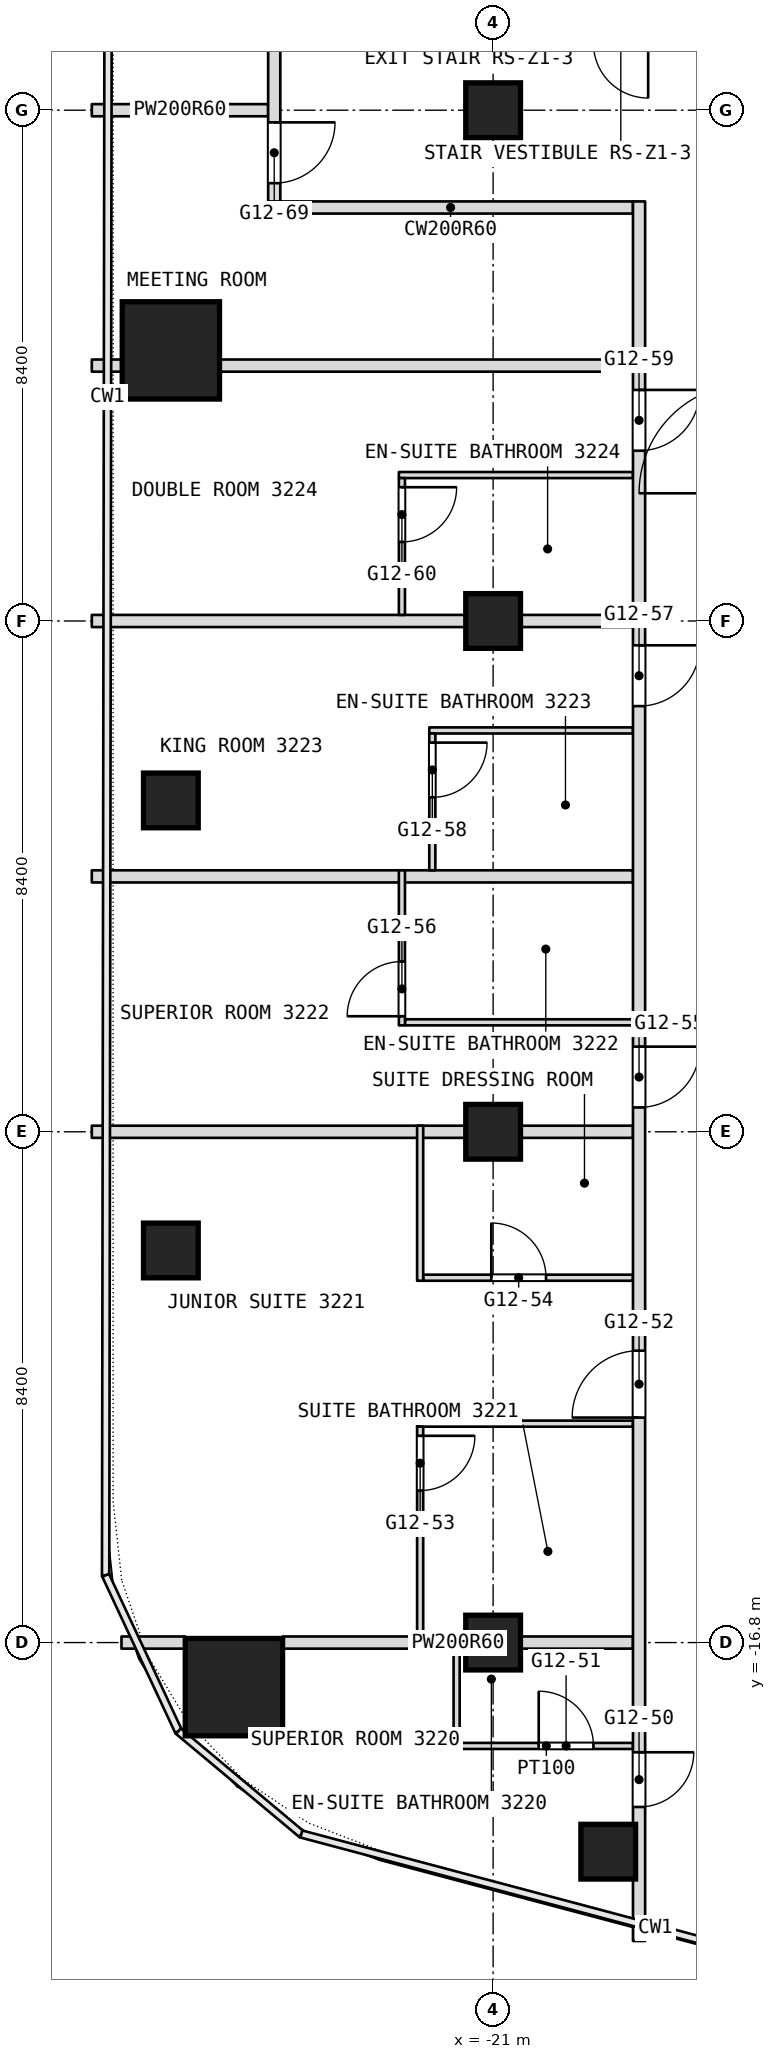
"""IFC4 building model, lengths in metres.
Left out: names, types, materials, properties, quantities, classifications, styles, units other than length and angle.
Written with IfcOpenShell. Run it as: python <this file> out.ifc"""

import sys

from ifc_helpers import new_model, si_unit, direction, frame, frame_2d, origin, origin_2d, place, context, subcontext, project, spatial, rectangle, extrude, element, fill, save


model = new_model("IFC4")
c1 = context("Model", 3, precision=1e-05, world=origin(), true_north=direction((0.0, 1.0)))
c2 = subcontext(c1, "Body", "Model", "MODEL_VIEW")
j1 = project(units=[si_unit("LENGTHUNIT", "METRE"), si_unit("PLANEANGLEUNIT", "RADIAN")], contexts=[c1])
p1 = place(None, origin())
s1 = spatial("IfcSite", under=j1, at=p1, CompositionType="ELEMENT")
p2 = place(p1, origin())
s2 = spatial("IfcBuilding", under=s1, at=p2, CompositionType="ELEMENT")
p3 = place(p2, frame((0.0, 0.0, 140.9)))
s3 = spatial("IfcBuildingStorey", under=s2, at=p3, CompositionType="ELEMENT", Elevation=140.9)
for number, where, z_axis, x_axis in (
    (1, (-25.263, -17.533, 0.0), (0.0, 0.0, 1.0), (1.0, 0.0, 0.0)),
    (2, (-26.3, 4.45, 0.0), (0.0, 0.0, 1.0), (1.0, 0.0, 0.0)),
):
    element("IfcColumn", number, at=place(p3, frame(where, z_axis=z_axis, x_axis=x_axis)), inside=s3, PredefinedType="COLUMN", context=c2, shape_type="SweptSolid", body=[
        extrude(rectangle(XDim=1.6, YDim=1.6, at=origin_2d()), origin(), (0.0, 0.0, 1.0), 3.6),
    ])
for number, where, z_axis, x_axis in (
    (3, (-21.0, -16.8, 0.0), (0.0, 0.0, 1.0), (1.0, 0.0, 0.0)),
    (4, (-21.0, -8.4, 0.0), (0.0, 0.0, 1.0), (1.0, 0.0, 0.0)),
    (5, (-21.0, 0.0, 0.0), (0.0, 0.0, 1.0), (1.0, 0.0, 0.0)),
    (6, (-21.0, 8.4, 0.0), (0.0, 0.0, 1.0), (1.0, 0.0, 0.0)),
    (7, (-26.3, -10.352, 0.0), (0.0, 0.0, 1.0), (1.0, 0.0, 0.0)),
    (8, (-26.3, -2.951, 0.0), (0.0, 0.0, 1.0), (1.0, 0.0, 0.0)),
    (9, (-19.107, -20.239, 0.0), (0.0, 0.0, 1.0), (1.0, 0.0, 0.0)),
):
    element("IfcColumn", number, at=place(p3, frame(where, z_axis=z_axis, x_axis=x_axis)), inside=s3, PredefinedType="COLUMN", context=c2, shape_type="SweptSolid", body=[
        extrude(rectangle(XDim=0.9, YDim=0.9, at=origin_2d()), origin(), (0.0, 0.0, 1.0), 3.6),
    ])
p4 = place(p3, frame((-21.55, -18.5, 0.0), z_axis=(0.0, 0.0, 1.0), x_axis=(1.0, 0.0, 0.0)))
e10 = element("IfcWall", 10, at=p4, inside=s3, PredefinedType="PARTITIONING", context=c2, shape_type="SweptSolid", body=[
    extrude(rectangle(XDim=2.85, YDim=0.1, at=frame_2d((1.425, 0.0))), origin(), (0.0, 0.0, 1.0), 3.34),
])
p5 = place(p4, frame((1.3, 0.0, 0.0)))
e11 = element("IfcOpeningElement", 11, at=p5, cuts=e10, PredefinedType="OPENING", context=c2, shape_type="SweptSolid", body=[
    extrude(rectangle(XDim=0.9, YDim=2.1, at=frame_2d((0.45, 1.05))), frame((0.0, 0.05, 0.0), z_axis=(0.0, -1.0, 0.0), x_axis=(1.0, 0.0, 0.0)), (0.0, 0.0, 1.0), 0.1),
])
p6 = place(p3, frame((-27.112, -16.8, 0.0), z_axis=(0.0, 0.0, 1.0), x_axis=(1.0, 0.0, 0.0)))
e12 = element("IfcWall", 12, at=p6, inside=s3, PredefinedType="PARTITIONING", context=c2, shape_type="SweptSolid", body=[
    extrude(rectangle(XDim=1.049, YDim=0.2, at=frame_2d((0.524, 0.0))), origin(), (0.0, 0.0, 1.0), 3.34),
])
p7 = place(p3, frame((-24.463, -16.8, 0.0), z_axis=(0.0, 0.0, 1.0), x_axis=(1.0, 0.0, 0.0)))
e13 = element("IfcWall", 13, at=p7, inside=s3, PredefinedType="PARTITIONING", context=c2, shape_type="SweptSolid", body=[
    extrude(rectangle(XDim=5.763, YDim=0.2, at=frame_2d((2.881, 0.0))), origin(), (0.0, 0.0, 1.0), 2.89),
])
p8 = place(p3, frame((-22.25, -13.2, 0.0), z_axis=(0.0, 0.0, 1.0), x_axis=(1.0, 0.0, 0.0)))
e14 = element("IfcWall", 14, at=p8, inside=s3, PredefinedType="PARTITIONING", context=c2, shape_type="SweptSolid", body=[
    extrude(rectangle(XDim=3.55, YDim=0.1, at=frame_2d((1.775, 0.0))), origin(), (0.0, 0.0, 1.0), 3.34),
])
p9 = place(p3, frame((-22.15, -10.8, 0.0), z_axis=(0.0, 0.0, 1.0), x_axis=(1.0, 0.0, 0.0)))
e15 = element("IfcWall", 15, at=p9, inside=s3, PredefinedType="PARTITIONING", context=c2, shape_type="SweptSolid", body=[
    extrude(rectangle(XDim=3.45, YDim=0.1, at=frame_2d((1.725, 0.0))), origin(), (0.0, 0.0, 1.0), 3.34),
])
p10 = place(p9, frame((1.12, 0.0, 0.0)))
e16 = element("IfcOpeningElement", 16, at=p10, cuts=e15, PredefinedType="OPENING", context=c2, shape_type="SweptSolid", body=[
    extrude(rectangle(XDim=0.9, YDim=2.1, at=frame_2d((0.45, 1.05))), frame((0.0, 0.05, 0.0), z_axis=(0.0, -1.0, 0.0), x_axis=(1.0, 0.0, 0.0)), (0.0, 0.0, 1.0), 0.1),
])
p11 = place(p3, frame((-27.6, -8.4, 0.0), z_axis=(0.0, 0.0, 1.0), x_axis=(1.0, 0.0, 0.0)))
e17 = element("IfcWall", 17, at=p11, inside=s3, PredefinedType="PARTITIONING", context=c2, shape_type="SweptSolid", body=[
    extrude(rectangle(XDim=8.9, YDim=0.2, at=frame_2d((4.45, 0.0))), origin(), (0.0, 0.0, 1.0), 2.89),
])
p12 = place(p3, frame((-22.45, -6.6, 0.0), z_axis=(0.0, 0.0, 1.0), x_axis=(1.0, 0.0, 0.0)))
e18 = element("IfcWall", 18, at=p12, inside=s3, PredefinedType="PARTITIONING", context=c2, shape_type="SweptSolid", body=[
    extrude(rectangle(XDim=3.75, YDim=0.1, at=frame_2d((1.875, 0.0))), origin(), (0.0, 0.0, 1.0), 3.34),
])
p13 = place(p3, frame((-27.6, -4.2, 0.0), z_axis=(0.0, 0.0, 1.0), x_axis=(1.0, 0.0, 0.0)))
e19 = element("IfcWall", 19, at=p13, inside=s3, PredefinedType="PARTITIONING", context=c2, shape_type="SweptSolid", body=[
    extrude(rectangle(XDim=8.9, YDim=0.2, at=frame_2d((4.45, 0.0))), origin(), (0.0, 0.0, 1.0), 3.34),
])
p14 = place(p3, frame((-22.05, -1.8, 0.0), z_axis=(0.0, 0.0, 1.0), x_axis=(1.0, 0.0, 0.0)))
e20 = element("IfcWall", 20, at=p14, inside=s3, PredefinedType="PARTITIONING", context=c2, shape_type="SweptSolid", body=[
    extrude(rectangle(XDim=3.35, YDim=0.1, at=frame_2d((1.675, 0.0))), origin(), (0.0, 0.0, 1.0), 3.34),
])
p15 = place(p3, frame((-27.6, 0.0, 0.0), z_axis=(0.0, 0.0, 1.0), x_axis=(1.0, 0.0, 0.0)))
e21 = element("IfcWall", 21, at=p15, inside=s3, PredefinedType="PARTITIONING", context=c2, shape_type="SweptSolid", body=[
    extrude(rectangle(XDim=8.9, YDim=0.2, at=frame_2d((4.45, 0.0))), origin(), (0.0, 0.0, 1.0), 2.89),
])
p16 = place(p3, frame((-22.55, 2.4, 0.0), z_axis=(0.0, 0.0, 1.0), x_axis=(1.0, 0.0, 0.0)))
e22 = element("IfcWall", 22, at=p16, inside=s3, PredefinedType="PARTITIONING", context=c2, shape_type="SweptSolid", body=[
    extrude(rectangle(XDim=3.85, YDim=0.1, at=frame_2d((1.925, 0.0))), origin(), (0.0, 0.0, 1.0), 3.34),
])
p17 = place(p3, frame((-27.6, 4.2, 0.0), z_axis=(0.0, 0.0, 1.0), x_axis=(1.0, 0.0, 0.0)))
e23 = element("IfcWall", 23, at=p17, inside=s3, PredefinedType="PARTITIONING", context=c2, shape_type="SweptSolid", body=[
    extrude(rectangle(XDim=0.5, YDim=0.2, at=frame_2d((0.25, 0.0))), origin(), (0.0, 0.0, 1.0), 3.34),
])
p18 = place(p3, frame((-25.5, 4.2, 0.0), z_axis=(0.0, 0.0, 1.0), x_axis=(1.0, 0.0, 0.0)))
e24 = element("IfcWall", 24, at=p18, inside=s3, PredefinedType="PARTITIONING", context=c2, shape_type="SweptSolid", body=[
    extrude(rectangle(XDim=6.8, YDim=0.2, at=frame_2d((3.4, 0.0))), origin(), (0.0, 0.0, 1.0), 3.34),
])
p19 = place(p3, frame((-24.7, 6.8, 0.0), z_axis=(0.0, 0.0, 1.0), x_axis=(1.0, 0.0, 0.0)))
e25 = element("IfcWall", 25, at=p19, inside=s3, PredefinedType="PARTITIONING", context=c2, shape_type="SweptSolid", body=[
    extrude(rectangle(XDim=6.0, YDim=0.2, at=frame_2d((3.0, 0.0))), origin(), (0.0, 0.0, 1.0), 3.34),
])
p20 = place(p3, frame((-27.6, 8.4, 0.0), z_axis=(0.0, 0.0, 1.0), x_axis=(1.0, 0.0, 0.0)))
e26 = element("IfcWall", 26, at=p20, inside=s3, PredefinedType="PARTITIONING", context=c2, shape_type="SweptSolid", body=[
    extrude(rectangle(XDim=2.9, YDim=0.2, at=frame_2d((1.45, 0.0))), origin(), (0.0, 0.0, 1.0), 2.89),
])
p21 = place(p3, frame((-18.6, -21.708, 0.0), z_axis=(0.0, 0.0, 1.0), x_axis=(0.0, 1.0, 0.0)))
e27 = element("IfcWall", 27, at=p21, inside=s3, PredefinedType="PARTITIONING", context=c2, shape_type="SweptSolid", body=[
    extrude(rectangle(XDim=28.608, YDim=0.2, at=frame_2d((14.304, 0.0))), origin(), (0.0, 0.0, 1.0), 3.34),
])
p22 = place(p21, frame((2.204, 0.0, 0.0)))
e28 = element("IfcOpeningElement", 28, at=p22, cuts=e27, PredefinedType="OPENING", context=c2, shape_type="SweptSolid", body=[
    extrude(rectangle(XDim=0.9, YDim=2.1, at=frame_2d((0.45, 1.05))), frame((0.0, 0.1, 0.0), z_axis=(0.0, -1.0, 0.0), x_axis=(1.0, 0.0, 0.0)), (0.0, 0.0, 1.0), 0.2),
])
p23 = place(p21, frame((8.608, 0.0, 0.0)))
e29 = element("IfcOpeningElement", 29, at=p23, cuts=e27, PredefinedType="OPENING", context=c2, shape_type="SweptSolid", body=[
    extrude(rectangle(XDim=1.1, YDim=2.1, at=frame_2d((0.55, 1.05))), frame((0.0, 0.1, 0.0), z_axis=(0.0, -1.0, 0.0), x_axis=(1.0, 0.0, 0.0)), (0.0, 0.0, 1.0), 0.2),
])
p24 = place(p21, frame((13.708, 0.0, 0.0)))
e30 = element("IfcOpeningElement", 30, at=p24, cuts=e27, PredefinedType="OPENING", context=c2, shape_type="SweptSolid", body=[
    extrude(rectangle(XDim=1.0, YDim=2.1, at=frame_2d((0.5, 1.05))), frame((0.0, 0.1, 0.0), z_axis=(0.0, -1.0, 0.0), x_axis=(1.0, 0.0, 0.0)), (0.0, 0.0, 1.0), 0.2),
])
p25 = place(p21, frame((20.308, 0.0, 0.0)))
e31 = element("IfcOpeningElement", 31, at=p25, cuts=e27, PredefinedType="OPENING", context=c2, shape_type="SweptSolid", body=[
    extrude(rectangle(XDim=1.0, YDim=2.1, at=frame_2d((0.5, 1.05))), frame((0.0, 0.1, 0.0), z_axis=(0.0, -1.0, 0.0), x_axis=(1.0, 0.0, 0.0)), (0.0, 0.0, 1.0), 0.2),
])
p26 = place(p21, frame((24.508, 0.0, 0.0)))
e32 = element("IfcOpeningElement", 32, at=p26, cuts=e27, PredefinedType="OPENING", context=c2, shape_type="SweptSolid", body=[
    extrude(rectangle(XDim=1.0, YDim=2.1, at=frame_2d((0.5, 1.05))), frame((0.0, 0.1, 0.0), z_axis=(0.0, -1.0, 0.0), x_axis=(1.0, 0.0, 0.0)), (0.0, 0.0, 1.0), 0.2),
])
p27 = place(p3, frame((-21.6, -18.55, 0.0), z_axis=(0.0, 0.0, 1.0), x_axis=(0.0, 1.0, 0.0)))
e33 = element("IfcWall", 33, at=p27, inside=s3, PredefinedType="PARTITIONING", context=c2, shape_type="SweptSolid", body=[
    extrude(rectangle(XDim=1.85, YDim=0.1, at=frame_2d((0.925, 0.0))), origin(), (0.0, 0.0, 1.0), 3.34),
])
p28 = place(p3, frame((-22.0, -4.1, 0.0), z_axis=(0.0, 0.0, 1.0), x_axis=(0.0, 1.0, 0.0)))
e34 = element("IfcWall", 34, at=p28, inside=s3, PredefinedType="PARTITIONING", context=c2, shape_type="SweptSolid", body=[
    extrude(rectangle(XDim=2.25, YDim=0.1, at=frame_2d((1.125, 0.0))), origin(), (0.0, 0.0, 1.0), 3.34),
])
p29 = place(p28, frame((1.2, 0.0, 0.0)))
e35 = element("IfcOpeningElement", 35, at=p29, cuts=e34, PredefinedType="OPENING", context=c2, shape_type="SweptSolid", body=[
    extrude(rectangle(XDim=0.9, YDim=2.1, at=frame_2d((0.45, 1.05))), frame((0.0, 0.05, 0.0), z_axis=(0.0, -1.0, 0.0), x_axis=(1.0, 0.0, 0.0)), (0.0, 0.0, 1.0), 0.1),
])
p30 = place(p3, frame((-22.2, -16.7, 0.0), z_axis=(0.0, 0.0, 1.0), x_axis=(0.0, 1.0, 0.0)))
e36 = element("IfcWall", 36, at=p30, inside=s3, PredefinedType="PARTITIONING", context=c2, shape_type="SweptSolid", body=[
    extrude(rectangle(XDim=3.45, YDim=0.1, at=frame_2d((1.725, 0.0))), origin(), (0.0, 0.0, 1.0), 3.34),
])
p31 = place(p30, frame((2.4, 0.0, 0.0)))
e37 = element("IfcOpeningElement", 37, at=p31, cuts=e36, PredefinedType="OPENING", context=c2, shape_type="SweptSolid", body=[
    extrude(rectangle(XDim=0.9, YDim=2.1, at=frame_2d((0.45, 1.05))), frame((0.0, 0.05, 0.0), z_axis=(0.0, -1.0, 0.0), x_axis=(1.0, 0.0, 0.0)), (0.0, 0.0, 1.0), 0.1),
])
p32 = place(p3, frame((-22.2, -10.85, 0.0), z_axis=(0.0, 0.0, 1.0), x_axis=(0.0, 1.0, 0.0)))
e38 = element("IfcWall", 38, at=p32, inside=s3, PredefinedType="PARTITIONING", context=c2, shape_type="SweptSolid", body=[
    extrude(rectangle(XDim=2.55, YDim=0.1, at=frame_2d((1.275, 0.0))), origin(), (0.0, 0.0, 1.0), 3.34),
])
p33 = place(p3, frame((-22.5, -6.65, 0.0), z_axis=(0.0, 0.0, 1.0), x_axis=(0.0, 1.0, 0.0)))
e39 = element("IfcWall", 39, at=p33, inside=s3, PredefinedType="PARTITIONING", context=c2, shape_type="SweptSolid", body=[
    extrude(rectangle(XDim=2.55, YDim=0.1, at=frame_2d((1.275, 0.0))), origin(), (0.0, 0.0, 1.0), 3.34),
])
p34 = place(p33, frame((0.15, 0.0, 0.0)))
e40 = element("IfcOpeningElement", 40, at=p34, cuts=e39, PredefinedType="OPENING", context=c2, shape_type="SweptSolid", body=[
    extrude(rectangle(XDim=0.9, YDim=2.1, at=frame_2d((0.45, 1.05))), frame((0.0, 0.05, 0.0), z_axis=(0.0, -1.0, 0.0), x_axis=(1.0, 0.0, 0.0)), (0.0, 0.0, 1.0), 0.1),
])
p35 = place(p3, frame((-22.5, 0.1, 0.0), z_axis=(0.0, 0.0, 1.0), x_axis=(0.0, 1.0, 0.0)))
e41 = element("IfcWall", 41, at=p35, inside=s3, PredefinedType="PARTITIONING", context=c2, shape_type="SweptSolid", body=[
    extrude(rectangle(XDim=2.25, YDim=0.1, at=frame_2d((1.125, 0.0))), origin(), (0.0, 0.0, 1.0), 3.34),
])
p36 = place(p35, frame((1.2, 0.0, 0.0)))
e42 = element("IfcOpeningElement", 42, at=p36, cuts=e41, PredefinedType="OPENING", context=c2, shape_type="SweptSolid", body=[
    extrude(rectangle(XDim=0.9, YDim=2.1, at=frame_2d((0.45, 1.05))), frame((0.0, 0.05, 0.0), z_axis=(0.0, -1.0, 0.0), x_axis=(1.0, 0.0, 0.0)), (0.0, 0.0, 1.0), 0.1),
])
p37 = place(p3, frame((-24.6, 6.9, 0.0), z_axis=(0.0, 0.0, 1.0), x_axis=(0.0, 1.0, 0.0)))
e43 = element("IfcWall", 43, at=p37, inside=s3, PredefinedType="PARTITIONING", context=c2, shape_type="SweptSolid", body=[
    extrude(rectangle(XDim=11.6, YDim=0.2, at=frame_2d((5.8, 0.0))), origin(), (0.0, 0.0, 1.0), 3.34),
])
p38 = place(p37, frame((5.45, 0.0, 0.0)))
e44 = element("IfcOpeningElement", 44, at=p38, cuts=e43, PredefinedType="OPENING", context=c2, shape_type="SweptSolid", body=[
    extrude(rectangle(XDim=1.8, YDim=2.1, at=frame_2d((0.9, 1.05))), frame((0.0, 0.1, 0.0), z_axis=(0.0, -1.0, 0.0), x_axis=(1.0, 0.0, 0.0)), (0.0, 0.0, 1.0), 0.2),
])
p39 = place(p37, frame((0.3, 0.0, 0.0)))
e45 = element("IfcOpeningElement", 45, at=p39, cuts=e43, PredefinedType="OPENING", context=c2, shape_type="SweptSolid", body=[
    extrude(rectangle(XDim=1.0, YDim=2.1, at=frame_2d((0.5, 1.05))), frame((0.0, 0.1, 0.0), z_axis=(0.0, -1.0, 0.0), x_axis=(1.0, 0.0, 0.0)), (0.0, 0.0, 1.0), 0.2),
])
p40 = place(p5, origin())
e46 = element("IfcDoor", 46, at=p40, inside=s3, OperationType="SINGLE_SWING_RIGHT", PredefinedType="DOOR", context=c2, shape_type="SweptSolid", body=[
    extrude(rectangle(XDim=0.9, YDim=2.1, at=frame_2d((0.45, 1.05))), frame((0.0, 0.025, 0.0), z_axis=(0.0, -1.0, 0.0), x_axis=(1.0, 0.0, 0.0)), (0.0, 0.0, 1.0), 0.05),
])
fill(e11, e46)
p41 = place(p10, origin())
e47 = element("IfcDoor", 47, at=p41, inside=s3, OperationType="SINGLE_SWING_LEFT", PredefinedType="DOOR", context=c2, shape_type="SweptSolid", body=[
    extrude(rectangle(XDim=0.9, YDim=2.1, at=frame_2d((0.45, 1.05))), frame((0.0, 0.025, 0.0), z_axis=(0.0, -1.0, 0.0), x_axis=(1.0, 0.0, 0.0)), (0.0, 0.0, 1.0), 0.05),
])
fill(e16, e47)
p42 = place(p22, origin())
e48 = element("IfcDoor", 48, at=p42, inside=s3, OperationType="SINGLE_SWING_RIGHT", PredefinedType="DOOR", context=c2, shape_type="SweptSolid", body=[
    extrude(rectangle(XDim=0.9, YDim=2.1, at=frame_2d((0.45, 1.05))), frame((0.0, 0.025, 0.0), z_axis=(0.0, -1.0, 0.0), x_axis=(1.0, 0.0, 0.0)), (0.0, 0.0, 1.0), 0.05),
])
fill(e28, e48)
p43 = place(p23, origin())
e49 = element("IfcDoor", 49, at=p43, inside=s3, OperationType="SINGLE_SWING_LEFT", PredefinedType="DOOR", context=c2, shape_type="SweptSolid", body=[
    extrude(rectangle(XDim=1.1, YDim=2.1, at=frame_2d((0.55, 1.05))), frame((0.0, 0.025, 0.0), z_axis=(0.0, -1.0, 0.0), x_axis=(1.0, 0.0, 0.0)), (0.0, 0.0, 1.0), 0.05),
])
fill(e29, e49)
p44 = place(p24, origin())
e50 = element("IfcDoor", 50, at=p44, inside=s3, OperationType="SINGLE_SWING_RIGHT", PredefinedType="DOOR", context=c2, shape_type="SweptSolid", body=[
    extrude(rectangle(XDim=1.0, YDim=2.1, at=frame_2d((0.5, 1.05))), frame((0.0, 0.025, 0.0), z_axis=(0.0, -1.0, 0.0), x_axis=(1.0, 0.0, 0.0)), (0.0, 0.0, 1.0), 0.05),
])
fill(e30, e50)
p45 = place(p25, origin())
e51 = element("IfcDoor", 51, at=p45, inside=s3, OperationType="SINGLE_SWING_RIGHT", PredefinedType="DOOR", context=c2, shape_type="SweptSolid", body=[
    extrude(rectangle(XDim=1.0, YDim=2.1, at=frame_2d((0.5, 1.05))), frame((0.0, 0.025, 0.0), z_axis=(0.0, -1.0, 0.0), x_axis=(1.0, 0.0, 0.0)), (0.0, 0.0, 1.0), 0.05),
])
fill(e31, e51)
p46 = place(p26, origin())
e52 = element("IfcDoor", 52, at=p46, inside=s3, OperationType="SINGLE_SWING_RIGHT", PredefinedType="DOOR", context=c2, shape_type="SweptSolid", body=[
    extrude(rectangle(XDim=1.0, YDim=2.1, at=frame_2d((0.5, 1.05))), frame((0.0, 0.025, 0.0), z_axis=(0.0, -1.0, 0.0), x_axis=(1.0, 0.0, 0.0)), (0.0, 0.0, 1.0), 0.05),
])
fill(e32, e52)
p47 = place(p29, origin())
e53 = element("IfcDoor", 53, at=p47, inside=s3, OperationType="SINGLE_SWING_LEFT", PredefinedType="DOOR", context=c2, shape_type="SweptSolid", body=[
    extrude(rectangle(XDim=0.9, YDim=2.1, at=frame_2d((0.45, 1.05))), frame((0.0, 0.025, 0.0), z_axis=(0.0, -1.0, 0.0), x_axis=(1.0, 0.0, 0.0)), (0.0, 0.0, 1.0), 0.05),
])
fill(e35, e53)
p48 = place(p31, origin())
e54 = element("IfcDoor", 54, at=p48, inside=s3, OperationType="SINGLE_SWING_LEFT", PredefinedType="DOOR", context=c2, shape_type="SweptSolid", body=[
    extrude(rectangle(XDim=0.9, YDim=2.1, at=frame_2d((0.45, 1.05))), frame((0.0, 0.025, 0.0), z_axis=(0.0, -1.0, 0.0), x_axis=(1.0, 0.0, 0.0)), (0.0, 0.0, 1.0), 0.05),
])
fill(e37, e54)
p49 = place(p34, origin())
e55 = element("IfcDoor", 55, at=p49, inside=s3, OperationType="SINGLE_SWING_RIGHT", PredefinedType="DOOR", context=c2, shape_type="SweptSolid", body=[
    extrude(rectangle(XDim=0.9, YDim=2.1, at=frame_2d((0.45, 1.05))), frame((0.0, 0.025, 0.0), z_axis=(0.0, -1.0, 0.0), x_axis=(1.0, 0.0, 0.0)), (0.0, 0.0, 1.0), 0.05),
])
fill(e40, e55)
p50 = place(p36, origin())
e56 = element("IfcDoor", 56, at=p50, inside=s3, OperationType="SINGLE_SWING_LEFT", PredefinedType="DOOR", context=c2, shape_type="SweptSolid", body=[
    extrude(rectangle(XDim=0.9, YDim=2.1, at=frame_2d((0.45, 1.05))), frame((0.0, 0.025, 0.0), z_axis=(0.0, -1.0, 0.0), x_axis=(1.0, 0.0, 0.0)), (0.0, 0.0, 1.0), 0.05),
])
fill(e42, e56)
p51 = place(p39, origin())
e57 = element("IfcDoor", 57, at=p51, inside=s3, OperationType="SINGLE_SWING_LEFT", PredefinedType="DOOR", context=c2, shape_type="SweptSolid", body=[
    extrude(rectangle(XDim=1.0, YDim=2.1, at=frame_2d((0.5, 1.05))), frame((0.0, 0.025, 0.0), z_axis=(0.0, -1.0, 0.0), x_axis=(1.0, 0.0, 0.0)), (0.0, 0.0, 1.0), 0.05),
])
fill(e45, e57)
save(model, sys.argv[1])
